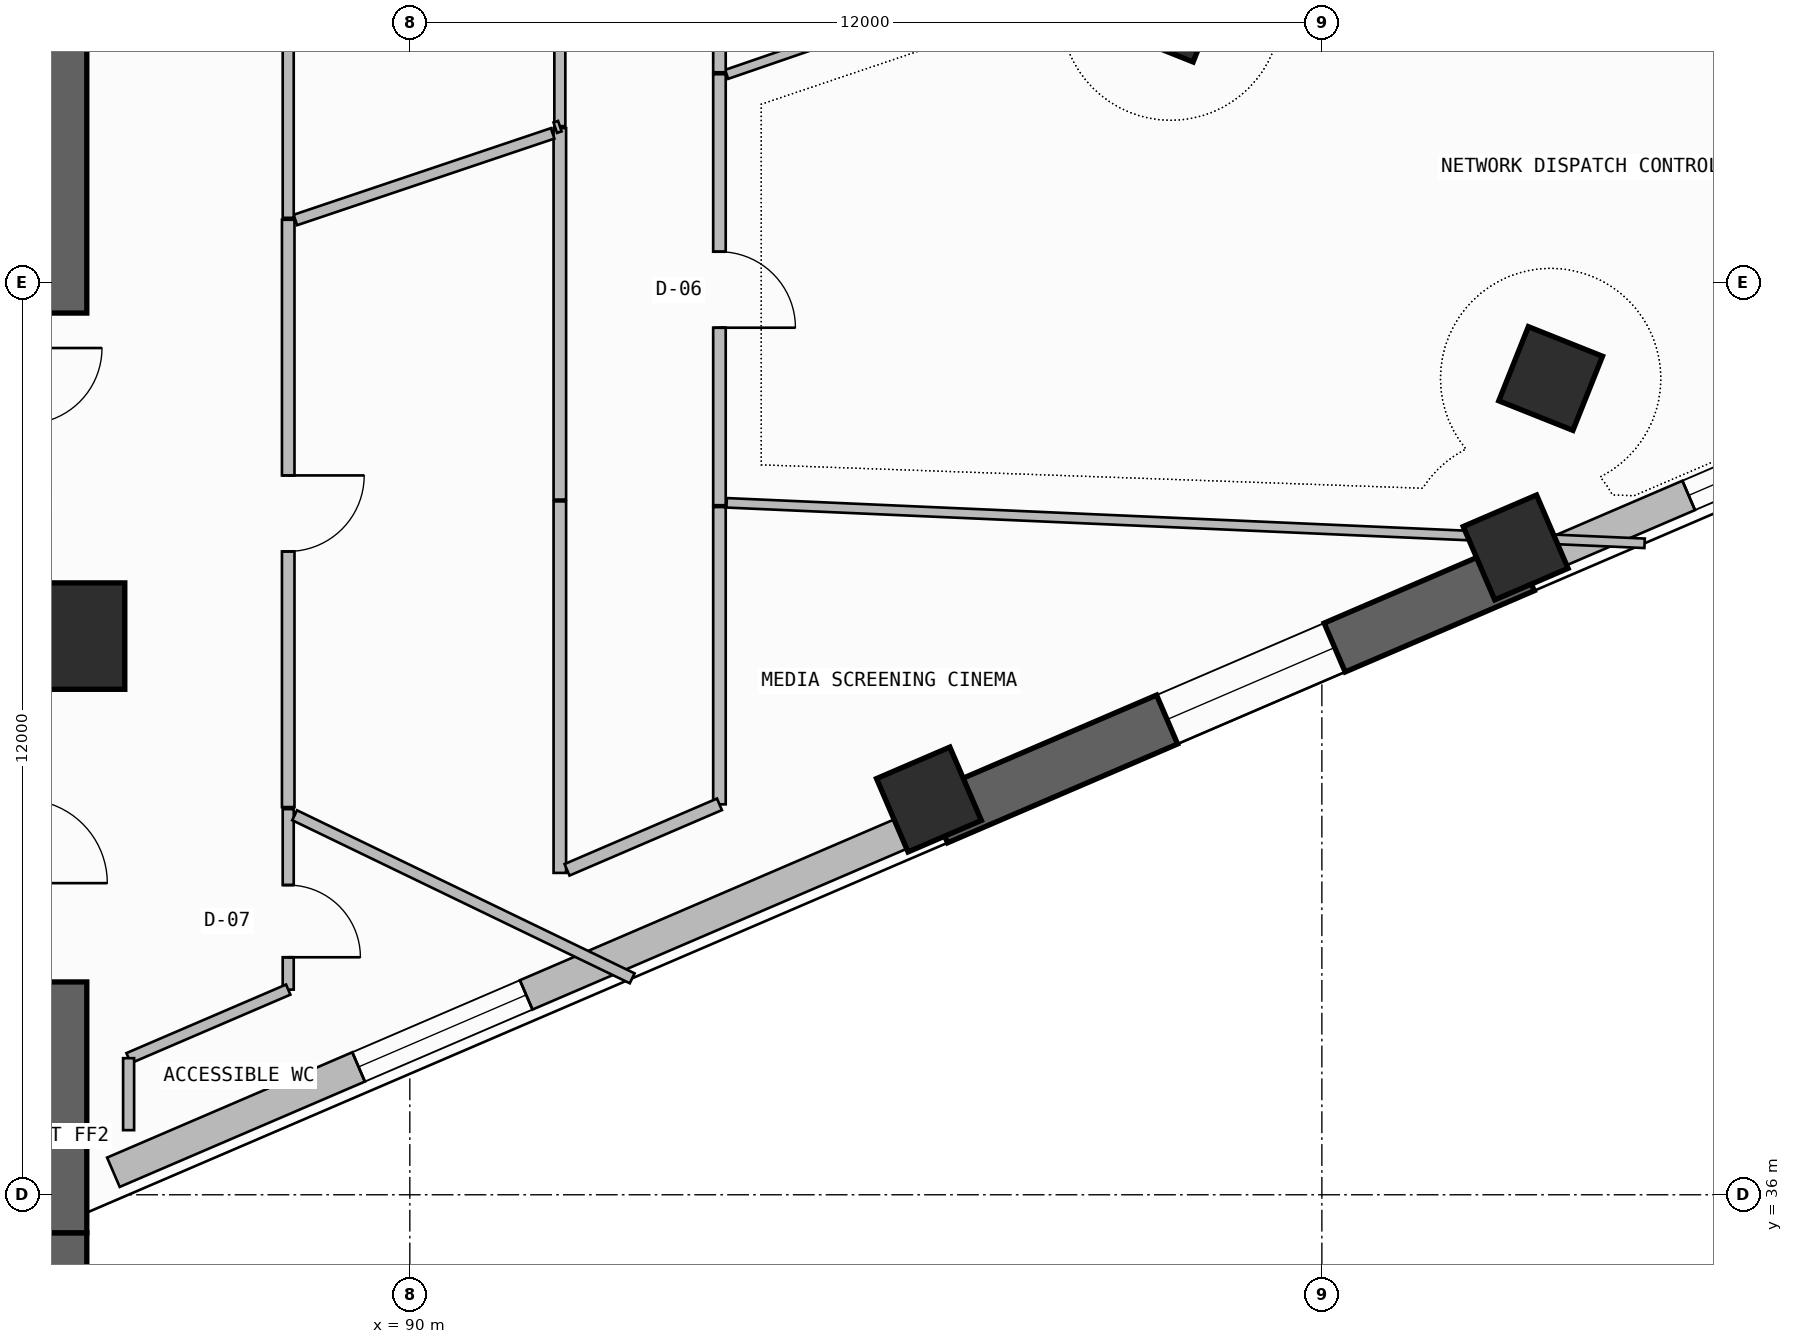
"""IFC4 building model, lengths in metres.
Left out: names, types, materials, properties, quantities, classifications, styles, units other than length and angle.
Written with IfcOpenShell. Run it as: python <this file> out.ifc"""

import sys

from ifc_helpers import new_model, si_unit, direction, frame, frame_2d, origin, origin_2d, place, context, subcontext, project, spatial, rectangle, extrude, element, fill, save


model = new_model("IFC4")
c1 = context("Model", 3, precision=1e-05, world=origin(), true_north=direction((0.0, 1.0)))
c2 = subcontext(c1, "Body", "Model", "MODEL_VIEW")
j1 = project(units=[si_unit("LENGTHUNIT", "METRE"), si_unit("PLANEANGLEUNIT", "RADIAN")], contexts=[c1])
p1 = place(None, origin())
s1 = spatial("IfcSite", under=j1, at=p1, CompositionType="ELEMENT")
p2 = place(p1, origin())
s2 = spatial("IfcBuilding", under=s1, at=p2, CompositionType="ELEMENT")
p3 = place(p2, frame((0.0, 0.0, 186.14)))
s3 = spatial("IfcBuildingStorey", under=s2, at=p3, CompositionType="ELEMENT", Elevation=186.14)
p4 = place(p3, frame((72.15, 35.125, -0.26), z_axis=(0.0, 0.0, 1.0), x_axis=(1.0, 0.0, 0.0)))
e1 = element("IfcWall", 1, at=p4, inside=s3, PredefinedType="SHEAR", context=c2, shape_type="SweptSolid", body=[
    extrude(rectangle(XDim=13.6, YDim=0.75, at=frame_2d((6.8, 0.0))), origin(), (0.0, 0.0, 1.0), 3.52),
])
p5 = place(p3, frame((85.375, 35.5, -0.26), z_axis=(0.0, 0.0, 1.0), x_axis=(0.0, 1.0, 0.0)))
e2 = element("IfcWall", 2, at=p5, inside=s3, PredefinedType="SHEAR", context=c2, shape_type="SweptSolid", body=[
    extrude(rectangle(XDim=3.3, YDim=0.75, at=frame_2d((1.65, 0.0))), origin(), (0.0, 0.0, 1.0), 3.52),
])
p6 = place(p3, frame((85.375, 47.6, -0.26), z_axis=(0.0, 0.0, 1.0), x_axis=(0.0, 1.0, 0.0)))
e3 = element("IfcWall", 3, at=p6, inside=s3, PredefinedType="SHEAR", context=c2, shape_type="SweptSolid", body=[
    extrude(rectangle(XDim=8.45, YDim=0.75, at=frame_2d((4.225, 0.0))), origin(), (0.0, 0.0, 1.0), 3.52),
])
p7 = place(p3, frame((85.55, 43.35, 0.0), z_axis=(0.0, 0.0, 1.0), x_axis=(1.0, 0.0, 0.0)))
e4 = element("IfcColumn", 4, at=p7, inside=s3, PredefinedType="COLUMN", context=c2, shape_type="SweptSolid", body=[
    extrude(rectangle(XDim=1.4, YDim=1.4, at=origin_2d()), origin(), (0.0, 0.0, 1.0), 3.52),
])
for number, where, z_axis, x_axis in (
    (5, (96.83, 41.2, 0.0), (0.0, 0.0, 1.0), (0.919, 0.395, 0.0)),
    (6, (104.549, 44.517, 0.0), (0.0, 0.0, 1.0), (0.919, 0.395, 0.0)),
    (7, (105.01, 46.739, 0.0), (0.0, 0.0, 1.0), (0.371, 0.929, 0.0)),
    (8, (100.013, 51.585, 0.0), (0.0, 0.0, 1.0), (0.371, 0.929, 0.0)),
):
    element("IfcColumn", number, at=place(p3, frame(where, z_axis=z_axis, x_axis=x_axis)), inside=s3, PredefinedType="COLUMN", context=c2, shape_type="SweptSolid", body=[
        extrude(rectangle(XDim=1.05, YDim=1.05, at=origin_2d()), origin(), (0.0, 0.0, 1.0), 3.52),
    ])
p8 = place(p3, frame((86.1, 36.296, 0.0), z_axis=(0.0, 0.0, 1.0), x_axis=(0.918792412723, 0.394741057306, 0.0)))
e9 = element("IfcWall", 9, at=p8, inside=s3, PredefinedType="SOLIDWALL", context=c2, shape_type="SweptSolid", body=[
    extrude(rectangle(XDim=11.794, YDim=0.42, at=frame_2d((5.897, 0.0))), origin(), (0.0, 0.0, 1.0), 2.245),
])
p9 = place(p8, frame((3.511, 0.0, 1.2)))
e10 = element("IfcOpeningElement", 10, at=p9, cuts=e9, PredefinedType="OPENING", context=c2, shape_type="SweptSolid", body=[
    extrude(rectangle(XDim=2.4, YDim=0.9, at=frame_2d((1.2, 0.45))), frame((0.0, 0.22, 0.0), z_axis=(0.0, -1.0, 0.0), x_axis=(1.0, 0.0, 0.0)), (0.0, 0.0, 1.0), 0.44),
])
p10 = place(p3, frame((96.937, 40.952, -0.26), z_axis=(0.0, 0.0, 1.0), x_axis=(0.918782407933, 0.394764343468, 0.0)))
e11 = element("IfcWall", 11, at=p10, inside=s3, PredefinedType="SHEAR", context=c2, shape_type="SweptSolid", body=[
    extrude(rectangle(XDim=8.402, YDim=0.7, at=frame_2d((4.201, 0.0))), origin(), (0.0, 0.0, 1.0), 3.52),
])
p11 = place(p10, frame((3.294, 0.0, 1.2)))
e12 = element("IfcOpeningElement", 12, at=p11, cuts=e11, PredefinedType="OPENING", context=c2, shape_type="SweptSolid", body=[
    extrude(rectangle(XDim=2.4, YDim=0.9, at=frame_2d((1.2, 0.45))), frame((0.0, 0.36, 0.0), z_axis=(0.0, -1.0, 0.0), x_axis=(1.0, 0.0, 0.0)), (0.0, 0.0, 1.0), 0.72),
])
p12 = place(p3, frame((104.656, 44.269, 0.0), z_axis=(0.0, 0.0, 1.0), x_axis=(0.918789071809, 0.394748833467, 0.0)))
e13 = element("IfcWall", 13, at=p12, inside=s3, PredefinedType="SOLIDWALL", context=c2, shape_type="SweptSolid", body=[
    extrude(rectangle(XDim=13.069, YDim=0.42, at=frame_2d((6.534, 0.0))), origin(), (0.0, 0.0, 1.0), 2.245),
])
p13 = place(p12, frame((2.362, 0.0, 1.2)))
e14 = element("IfcOpeningElement", 14, at=p13, cuts=e13, PredefinedType="OPENING", context=c2, shape_type="SweptSolid", body=[
    extrude(rectangle(XDim=2.4, YDim=0.9, at=frame_2d((1.2, 0.45))), frame((0.0, 0.22, 0.0), z_axis=(0.0, -1.0, 0.0), x_axis=(1.0, 0.0, 0.0)), (0.0, 0.0, 1.0), 0.44),
])
p14 = place(p3, frame((88.4, 38.699, 0.0), z_axis=(0.0, 0.0, 1.0), x_axis=(0.0, 1.0, 0.0)))
e15 = element("IfcWall", 15, at=p14, inside=s3, PredefinedType="PARTITIONING", context=c2, shape_type="SweptSolid", body=[
    extrude(rectangle(XDim=2.375, YDim=0.145, at=frame_2d((1.187, 0.0))), origin(), (0.0, 0.0, 1.0), 3.26),
])
p15 = place(p14, frame((0.425, 0.0, 0.0)))
e16 = element("IfcOpeningElement", 16, at=p15, cuts=e15, PredefinedType="OPENING", context=c2, shape_type="SweptSolid", body=[
    extrude(rectangle(XDim=0.95, YDim=2.15, at=frame_2d((0.475, 1.075))), frame((0.0, 0.083, 0.0), z_axis=(0.0, -1.0, 0.0), x_axis=(1.0, 0.0, 0.0)), (0.0, 0.0, 1.0), 0.165),
])
p16 = place(p3, frame((86.3, 37.797, 0.0), z_axis=(0.0, 0.0, 1.0), x_axis=(0.918802105609, 0.39471849555, 0.0)))
e17 = element("IfcWall", 17, at=p16, inside=s3, PredefinedType="PARTITIONING", context=c2, shape_type="SweptSolid", body=[
    extrude(rectangle(XDim=2.285, YDim=0.145, at=frame_2d((1.143, 0.0))), origin(), (0.0, 0.0, 1.0), 3.26),
])
p17 = place(p3, frame((88.485, 40.993, 0.0), z_axis=(0.0, 0.0, 1.0), x_axis=(0.900442674897, -0.434974699523, 0.0)))
e18 = element("IfcWall", 18, at=p17, inside=s3, PredefinedType="PARTITIONING", context=c2, shape_type="SweptSolid", body=[
    extrude(rectangle(XDim=4.932, YDim=0.145, at=frame_2d((2.466, 0.0))), origin(), (0.0, 0.0, 1.0), 3.26),
])
p18 = place(p3, frame((94.074, 45.072, 0.0), z_axis=(0.0, 0.0, 1.0), x_axis=(0.0, 1.0, 0.0)))
e19 = element("IfcWall", 19, at=p18, inside=s3, PredefinedType="PARTITIONING", context=c2, shape_type="SweptSolid", body=[
    extrude(rectangle(XDim=5.67, YDim=0.165, at=frame_2d((2.835, 0.0))), origin(), (0.0, 0.0, 1.0), 2.745),
])
p19 = place(p18, frame((2.335, 0.0, 0.0)))
e20 = element("IfcOpeningElement", 20, at=p19, cuts=e19, PredefinedType="OPENING", context=c2, shape_type="SweptSolid", body=[
    extrude(rectangle(XDim=1.0, YDim=2.2, at=frame_2d((0.5, 1.1))), frame((0.0, 0.093, 0.0), z_axis=(0.0, -1.0, 0.0), x_axis=(1.0, 0.0, 0.0)), (0.0, 0.0, 1.0), 0.185),
])
p20 = place(p3, frame((106.246, 44.571, 0.0), z_axis=(0.0, 0.0, 1.0), x_axis=(-0.999028718702, 0.044063808377, 0.0)))
e21 = element("IfcWall", 21, at=p20, inside=s3, PredefinedType="PARTITIONING", context=c2, shape_type="SweptSolid", body=[
    extrude(rectangle(XDim=12.09, YDim=0.125, at=frame_2d((6.045, 0.0))), origin(), (0.0, 0.0, 1.0), 2.245),
])
p21 = place(p3, frame((94.168, 50.74, 0.0), z_axis=(0.0, 0.0, 1.0), x_axis=(0.945674142281, 0.325116004867, 0.0)))
e22 = element("IfcWall", 22, at=p21, inside=s3, PredefinedType="PARTITIONING", context=c2, shape_type="SweptSolid", body=[
    extrude(rectangle(XDim=14.875, YDim=0.125, at=frame_2d((7.438, 0.0))), origin(), (0.0, 0.0, 1.0), 2.645),
])
p22 = place(p3, frame((88.4, 41.1, 0.0), z_axis=(0.0, 0.0, 1.0), x_axis=(0.0, 1.0, 0.0)))
e23 = element("IfcWall", 23, at=p22, inside=s3, PredefinedType="PARTITIONING", context=c2, shape_type="SweptSolid", body=[
    extrude(rectangle(XDim=7.727, YDim=0.165, at=frame_2d((3.864, 0.0))), origin(), (0.0, 0.0, 1.0), 2.745),
])
p23 = place(p22, frame((3.364, 0.0, 0.0)))
e24 = element("IfcOpeningElement", 24, at=p23, cuts=e23, PredefinedType="OPENING", context=c2, shape_type="SweptSolid", body=[
    extrude(rectangle(XDim=1.0, YDim=2.2, at=frame_2d((0.5, 1.1))), frame((0.0, 0.093, 0.0), z_axis=(0.0, -1.0, 0.0), x_axis=(1.0, 0.0, 0.0)), (0.0, 0.0, 1.0), 0.185),
])
p24 = place(p3, frame((91.974, 45.122, 0.0), z_axis=(0.0, 0.0, 1.0), x_axis=(0.0, -1.0, 0.0)))
e25 = element("IfcWall", 25, at=p24, inside=s3, PredefinedType="PARTITIONING", context=c2, shape_type="SweptSolid", body=[
    extrude(rectangle(XDim=4.887, YDim=0.165, at=frame_2d((2.444, 0.0))), origin(), (0.0, 0.0, 1.0), 2.745),
])
p25 = place(p3, frame((91.974, 50.034, 0.0), z_axis=(0.0, 0.0, 1.0), x_axis=(0.0, -1.0, 0.0)))
e26 = element("IfcWall", 26, at=p25, inside=s3, PredefinedType="PARTITIONING", context=c2, shape_type="SweptSolid", body=[
    extrude(rectangle(XDim=4.887, YDim=0.165, at=frame_2d((2.444, 0.0))), origin(), (0.0, 0.0, 1.0), 3.26),
])
p26 = place(p3, frame((94.074, 41.137, 0.0), z_axis=(0.0, 0.0, 1.0), x_axis=(0.0, 1.0, 0.0)))
e27 = element("IfcWall", 27, at=p26, inside=s3, PredefinedType="PARTITIONING", context=c2, shape_type="SweptSolid", body=[
    extrude(rectangle(XDim=3.911, YDim=0.165, at=frame_2d((1.956, 0.0))), origin(), (0.0, 0.0, 1.0), 2.745),
])
p27 = place(p3, frame((92.068, 40.275, 0.0), z_axis=(0.0, 0.0, 1.0), x_axis=(0.91880916067, 0.394702072794, 0.0)))
e28 = element("IfcWall", 28, at=p27, inside=s3, PredefinedType="PARTITIONING", context=c2, shape_type="SweptSolid", body=[
    extrude(rectangle(XDim=2.183, YDim=0.165, at=frame_2d((1.091, 0.0))), origin(), (0.0, 0.0, 1.0), 3.26),
])
p28 = place(p3, frame((88.494, 48.825, 0.0), z_axis=(0.0, 0.0, 1.0), x_axis=(0.947763274115, 0.318974569895, 0.0)))
e29 = element("IfcWall", 29, at=p28, inside=s3, PredefinedType="PARTITIONING", context=c2, shape_type="SweptSolid", body=[
    extrude(rectangle(XDim=3.571, YDim=0.145, at=frame_2d((1.786, 0.0))), origin(), (0.0, 0.0, 1.0), 3.26),
])
p29 = place(p3, frame((88.4, 48.853, 0.0), z_axis=(0.0, 0.0, 1.0), x_axis=(0.0, 1.0, 0.0)))
e30 = element("IfcWall", 30, at=p29, inside=s3, PredefinedType="PARTITIONING", context=c2, shape_type="SweptSolid", body=[
    extrude(rectangle(XDim=7.497, YDim=0.145, at=frame_2d((3.749, 0.0))), origin(), (0.0, 0.0, 1.0), 2.745),
])
p30 = place(p29, frame((3.299, 0.0, 0.0)))
e31 = element("IfcOpeningElement", 31, at=p30, cuts=e30, PredefinedType="OPENING", context=c2, shape_type="SweptSolid", body=[
    extrude(rectangle(XDim=0.9, YDim=2.1, at=frame_2d((0.45, 1.05))), frame((0.0, 0.083, 0.0), z_axis=(0.0, -1.0, 0.0), x_axis=(1.0, 0.0, 0.0)), (0.0, 0.0, 1.0), 0.165),
])
p31 = place(p3, frame((91.974, 56.35, 0.0), z_axis=(0.0, 0.0, 1.0), x_axis=(0.0, -1.0, 0.0)))
e32 = element("IfcWall", 32, at=p31, inside=s3, PredefinedType="PARTITIONING", context=c2, shape_type="SweptSolid", body=[
    extrude(rectangle(XDim=6.291, YDim=0.145, at=frame_2d((3.146, 0.0))), origin(), (0.0, 0.0, 1.0), 2.745),
])
p32 = place(p3, frame((91.974, 50.059, 0.0), z_axis=(0.0, 0.0, 1.0), x_axis=(-0.948295528016, -0.317388707336, 0.0)))
e33 = element("IfcWall", 33, at=p32, inside=s3, PredefinedType="PARTITIONING", context=c2, shape_type="SweptSolid", body=[
    extrude(rectangle(XDim=0.063, YDim=0.145, at=frame_2d((0.031, 0.0))), origin(), (0.0, 0.0, 1.0), 3.26),
])
p33 = place(p3, frame((94.074, 50.768, 0.0), z_axis=(0.0, 0.0, 1.0), x_axis=(0.0, 1.0, 0.0)))
e34 = element("IfcWall", 34, at=p33, inside=s3, PredefinedType="PARTITIONING", context=c2, shape_type="SweptSolid", body=[
    extrude(rectangle(XDim=8.057, YDim=0.165, at=frame_2d((4.028, 0.0))), origin(), (0.0, 0.0, 1.0), 2.645),
])
p34 = place(p3, frame((86.3, 36.85, 0.0), z_axis=(0.0, 0.0, 1.0), x_axis=(0.0, 1.0, 0.0)))
e35 = element("IfcWall", 35, at=p34, inside=s3, PredefinedType="PARTITIONING", context=c2, shape_type="SweptSolid", body=[
    extrude(rectangle(XDim=0.947, YDim=0.145, at=frame_2d((0.474, 0.0))), origin(), (0.0, 0.0, 1.0), 3.26),
])
p35 = place(p9, origin())
e36 = element("IfcWindow", 36, at=p35, inside=s3, PartitioningType="SINGLE_PANEL", PredefinedType="WINDOW", context=c2, shape_type="SweptSolid", body=[
    extrude(rectangle(XDim=2.4, YDim=0.9, at=frame_2d((1.2, 0.45))), frame((0.0, 0.03, 0.0), z_axis=(0.0, -1.0, 0.0), x_axis=(1.0, 0.0, 0.0)), (0.0, 0.0, 1.0), 0.06),
])
fill(e10, e36)
p36 = place(p11, origin())
e37 = element("IfcWindow", 37, at=p36, inside=s3, PartitioningType="SINGLE_PANEL", PredefinedType="WINDOW", context=c2, shape_type="SweptSolid", body=[
    extrude(rectangle(XDim=2.4, YDim=0.9, at=frame_2d((1.2, 0.45))), frame((0.0, 0.03, 0.0), z_axis=(0.0, -1.0, 0.0), x_axis=(1.0, 0.0, 0.0)), (0.0, 0.0, 1.0), 0.06),
])
fill(e12, e37)
p37 = place(p13, origin())
e38 = element("IfcWindow", 38, at=p37, inside=s3, PartitioningType="SINGLE_PANEL", PredefinedType="WINDOW", context=c2, shape_type="SweptSolid", body=[
    extrude(rectangle(XDim=2.4, YDim=0.9, at=frame_2d((1.2, 0.45))), frame((0.0, 0.03, 0.0), z_axis=(0.0, -1.0, 0.0), x_axis=(1.0, 0.0, 0.0)), (0.0, 0.0, 1.0), 0.06),
])
fill(e14, e38)
p38 = place(p15, frame((0.95, 0.0, 0.0), z_axis=(0.0, 0.0, 1.0), x_axis=(-1.0, 0.0, 0.0)))
e39 = element("IfcDoor", 39, at=p38, inside=s3, OperationType="SINGLE_SWING_RIGHT", PredefinedType="DOOR", context=c2, shape_type="SweptSolid", body=[
    extrude(rectangle(XDim=0.95, YDim=2.15, at=frame_2d((0.475, 1.075))), frame((0.0, 0.025, 0.0), z_axis=(0.0, -1.0, 0.0), x_axis=(1.0, 0.0, 0.0)), (0.0, 0.0, 1.0), 0.05),
])
fill(e16, e39)
p39 = place(p19, frame((1.0, 0.0, 0.0), z_axis=(0.0, 0.0, 1.0), x_axis=(-1.0, 0.0, 0.0)))
e40 = element("IfcDoor", 40, at=p39, inside=s3, OperationType="SINGLE_SWING_RIGHT", PredefinedType="DOOR", context=c2, shape_type="SweptSolid", body=[
    extrude(rectangle(XDim=1.0, YDim=2.2, at=frame_2d((0.5, 1.1))), frame((0.0, 0.025, 0.0), z_axis=(0.0, -1.0, 0.0), x_axis=(1.0, 0.0, 0.0)), (0.0, 0.0, 1.0), 0.05),
])
fill(e20, e40)
p40 = place(p23, frame((1.0, 0.0, 0.0), z_axis=(0.0, 0.0, 1.0), x_axis=(-1.0, 0.0, 0.0)))
e41 = element("IfcDoor", 41, at=p40, inside=s3, OperationType="SINGLE_SWING_LEFT", PredefinedType="DOOR", context=c2, shape_type="SweptSolid", body=[
    extrude(rectangle(XDim=1.0, YDim=2.2, at=frame_2d((0.5, 1.1))), frame((0.0, 0.025, 0.0), z_axis=(0.0, -1.0, 0.0), x_axis=(1.0, 0.0, 0.0)), (0.0, 0.0, 1.0), 0.05),
])
fill(e24, e41)
save(model, sys.argv[1])
